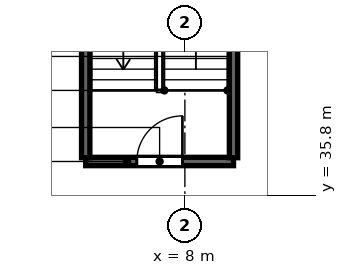
"""IFC4 building model, lengths in metres.
Left out: names, types, materials, properties, quantities, classifications, styles, units other than length and angle.
Written with IfcOpenShell. Run it as: python <this file> out.ifc"""

import sys

from ifc_helpers import new_model, si_unit, direction, frame, frame_2d, origin, place, context, subcontext, project, spatial, rectangle, extrude, source, transform, mapped, element, fill, save


model = new_model("IFC4")
c1 = context("Model", 3, precision=1e-05, world=origin(), true_north=direction((0.0, 1.0)))
c2 = subcontext(c1, "Body", "Model", "MODEL_VIEW")
j1 = project(units=[si_unit("LENGTHUNIT", "METRE"), si_unit("PLANEANGLEUNIT", "RADIAN")], contexts=[c1])
p1 = place(None, origin())
s1 = spatial("IfcSite", under=j1, at=p1, CompositionType="ELEMENT")
p2 = place(p1, origin())
s2 = spatial("IfcBuilding", under=s1, at=p2, CompositionType="ELEMENT")
p3 = place(p2, frame((0.0, 0.0, -5.0)))
s3 = spatial("IfcBuildingStorey", under=s2, at=p3, CompositionType="ELEMENT", Elevation=-5.0)
m1 = source(origin(), c2, "Body", "SweptSolid", [
    extrude(rectangle(XDim=3.89, YDim=0.22, at=frame_2d((1.945, 0.0))), origin(), (0.0, 0.0, 1.0), 5.0),
])
p4 = place(p3, frame((5.39, 36.69, 0.0), z_axis=(0.0, 0.0, 1.0), x_axis=(1.0, 0.0, 0.0)))
e1 = element("IfcWall", 1, at=p4, inside=s3, PredefinedType="SOLIDWALL", context=c2, shape_type="MappedRepresentation", body=[
    mapped(m1, transform((0.0, 0.0, 0.0), scale=1.0)),
])
p5 = place(p4, frame((1.345, 0.0, 0.0)))
e2 = element("IfcOpeningElement", 2, at=p5, cuts=e1, PredefinedType="OPENING", context=c2, shape_type="SweptSolid", body=[
    extrude(rectangle(XDim=1.2, YDim=2.15, at=frame_2d((0.6, 1.075))), frame((0.0, 0.12, 0.0), z_axis=(0.0, -1.0, 0.0), x_axis=(1.0, 0.0, 0.0)), (0.0, 0.0, 1.0), 0.24),
])
m2 = source(origin(), c2, "Body", "SweptSolid", [
    extrude(rectangle(XDim=10.422, YDim=0.22, at=frame_2d((5.211, 0.0))), origin(), (0.0, 0.0, 1.0), 5.0),
])
for number, where, z_axis, x_axis in (
    (3, (5.39, 36.789, 0.0), (0.0, 0.0, 1.0), (0.0, 1.0, 0.0)),
    (4, (9.28, 36.789, 0.0), (0.0, 0.0, 1.0), (0.0, 1.0, 0.0)),
):
    element("IfcWall", number, at=place(p3, frame(where, z_axis=z_axis, x_axis=x_axis)), inside=s3, PredefinedType="SOLIDWALL", context=c2, shape_type="MappedRepresentation", body=[
        mapped(m2, transform((0.0, 0.0, 0.0), scale=1.0)),
    ])
m3 = source(origin(), c2, "Body", "SweptSolid", [
    extrude(rectangle(XDim=1.2, YDim=2.15, at=frame_2d((0.6, 1.075))), frame((0.0, 0.025, 0.0), z_axis=(0.0, -1.0, 0.0), x_axis=(1.0, 0.0, 0.0)), (0.0, 0.0, 1.0), 0.05),
])
p6 = place(p5, origin())
e5 = element("IfcDoor", 5, at=p6, inside=s3, OperationType="SINGLE_SWING_RIGHT", PredefinedType="DOOR", context=c2, shape_type="MappedRepresentation", body=[
    mapped(m3, transform((0.0, 0.0, 0.0), scale=1.0)),
])
fill(e2, e5)
save(model, sys.argv[1])
